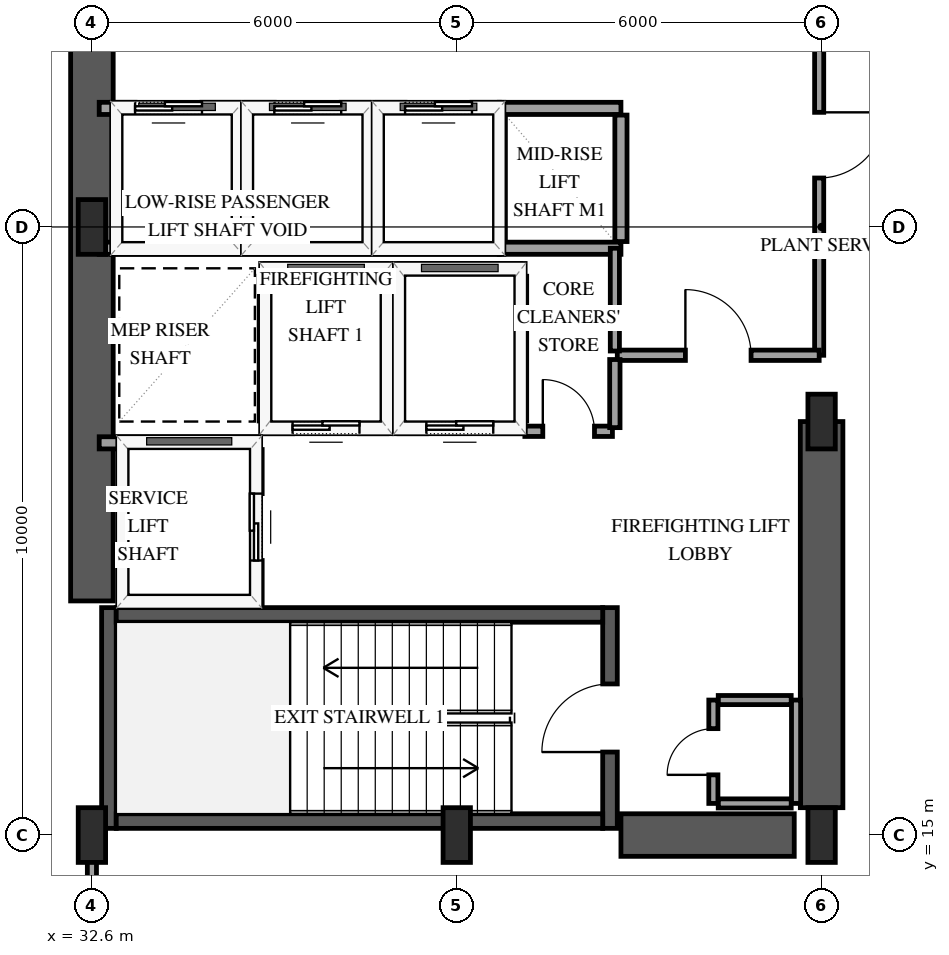
"""IFC4 building model, lengths in metres.
Left out: names, types, materials, properties, quantities, classifications, styles, units other than length and angle.
Written with IfcOpenShell. Run it as: python <this file> out.ifc"""

import sys

from ifc_helpers import new_model, si_unit, direction, frame, frame_2d, origin, origin_2d, place, context, subcontext, project, spatial, rectangle, extrude, element, fill, save


model = new_model("IFC4")
c1 = context("Model", 3, precision=1e-05, world=origin(), true_north=direction((0.0, 1.0)))
c2 = subcontext(c1, "Body", "Model", "MODEL_VIEW")
j1 = project(units=[si_unit("LENGTHUNIT", "METRE"), si_unit("PLANEANGLEUNIT", "RADIAN")], contexts=[c1])
p1 = place(None, origin())
s1 = spatial("IfcSite", under=j1, at=p1, CompositionType="ELEMENT")
p2 = place(p1, origin())
s2 = spatial("IfcBuilding", under=s1, at=p2, CompositionType="ELEMENT")
p3 = place(p2, frame((0.0, 0.0, 82.6)))
s3 = spatial("IfcBuildingStorey", under=s2, at=p3, CompositionType="ELEMENT", Elevation=82.6)
p4 = place(p3, frame((32.88, 15.11, 0.0), z_axis=(0.0, 0.0, 1.0), x_axis=(0.0, 1.0, 0.0)))
e1 = element("IfcWall", 1, at=p4, inside=s3, PredefinedType="SHEAR", context=c2, shape_type="SweptSolid", body=[
    extrude(rectangle(XDim=3.63, YDim=0.24, at=frame_2d((1.815, 0.0))), origin(), (0.0, 0.0, 1.0), 4.8),
])
p5 = place(p3, frame((41.12, 15.11, 0.0), z_axis=(0.0, 0.0, 1.0), x_axis=(0.0, 1.0, 0.0)))
e2 = element("IfcWall", 2, at=p5, inside=s3, PredefinedType="SHEAR", context=c2, shape_type="SweptSolid", body=[
    extrude(rectangle(XDim=3.63, YDim=0.24, at=frame_2d((1.815, 0.0))), origin(), (0.0, 0.0, 1.0), 4.8),
])
p6 = place(p5, frame((1.255, 0.0, 0.0)))
e3 = element("IfcOpeningElement", 3, at=p6, cuts=e2, PredefinedType="OPENING", context=c2, shape_type="SweptSolid", body=[
    extrude(rectangle(XDim=1.12, YDim=2.15, at=frame_2d((0.56, 1.075))), frame((0.0, 0.13, 0.0), z_axis=(0.0, -1.0, 0.0), x_axis=(1.0, 0.0, 0.0)), (0.0, 0.0, 1.0), 0.26),
])
for number, where, z_axis, x_axis in (
    (4, (33.0, 15.23, 0.0), (0.0, 0.0, 1.0), (1.0, 0.0, 0.0)),
    (5, (33.0, 18.62, 0.0), (0.0, 0.0, 1.0), (1.0, 0.0, 0.0)),
):
    element("IfcWall", number, at=place(p3, frame(where, z_axis=z_axis, x_axis=x_axis)), inside=s3, PredefinedType="SHEAR", context=c2, shape_type="SweptSolid", body=[
        extrude(rectangle(XDim=8.0, YDim=0.24, at=frame_2d((4.0, 0.0))), origin(), (0.0, 0.0, 1.0), 4.8),
    ])
p7 = place(p3, frame((32.6, 18.85, 0.0), z_axis=(0.0, 0.0, 1.0), x_axis=(0.0, 1.0, 0.0)))
e6 = element("IfcWall", 6, at=p7, inside=s3, PredefinedType="SHEAR", context=c2, shape_type="SweptSolid", body=[
    extrude(rectangle(XDim=12.3, YDim=0.7, at=frame_2d((6.15, 0.0))), origin(), (0.0, 0.0, 1.0), 4.8),
])
p8 = place(p3, frame((41.3, 15.0, 0.0), z_axis=(0.0, 0.0, 1.0), x_axis=(1.0, 0.0, 0.0)))
e7 = element("IfcWall", 7, at=p8, inside=s3, PredefinedType="SHEAR", context=c2, shape_type="SweptSolid", body=[
    extrude(rectangle(XDim=2.85, YDim=0.7, at=frame_2d((1.425, 0.0))), origin(), (0.0, 0.0, 1.0), 4.8),
])
p9 = place(p3, frame((44.6, 15.45, 0.0), z_axis=(0.0, 0.0, 1.0), x_axis=(0.0, 1.0, 0.0)))
e8 = element("IfcWall", 8, at=p9, inside=s3, PredefinedType="SHEAR", context=c2, shape_type="SweptSolid", body=[
    extrude(rectangle(XDim=6.35, YDim=0.7, at=frame_2d((3.175, 0.0))), origin(), (0.0, 0.0, 1.0), 4.8),
])
for number, where, z_axis, x_axis in (
    (9, (32.6, 15.0, 0.0), (0.0, 0.0, 1.0), (1.0, 0.0, 0.0)),
    (10, (32.6, 25.0, 0.0), (0.0, 0.0, 1.0), (1.0, 0.0, 0.0)),
    (11, (38.6, 15.0, 0.0), (0.0, 0.0, 1.0), (1.0, 0.0, 0.0)),
    (12, (44.6, 15.0, 0.0), (0.0, 0.0, 1.0), (1.0, 0.0, 0.0)),
    (13, (44.6, 21.8, 0.0), (0.0, 0.0, 1.0), (1.0, 0.0, 0.0)),
):
    element("IfcColumn", number, at=place(p3, frame(where, z_axis=z_axis, x_axis=x_axis)), inside=s3, PredefinedType="PILASTER", context=c2, shape_type="SweptSolid", body=[
        extrude(rectangle(XDim=0.45, YDim=0.9, at=origin_2d()), origin(), (0.0, 0.0, 1.0), 4.5),
    ])
p10 = place(p3, frame((35.45, 21.7, 0.0), z_axis=(0.0, 0.0, 1.0), x_axis=(1.0, 0.0, 0.0)))
e14 = element("IfcWall", 14, at=p10, inside=s3, PredefinedType="SOLIDWALL", context=c2, shape_type="SweptSolid", body=[
    extrude(rectangle(XDim=2.0, YDim=0.2, at=frame_2d((1.0, 0.0))), origin(), (0.0, 0.0, 1.0), 4.5),
])
p11 = place(p10, frame((0.45, 0.0, 0.0)))
e15 = element("IfcOpeningElement", 15, at=p11, cuts=e14, PredefinedType="OPENING", context=c2, shape_type="SweptSolid", body=[
    extrude(rectangle(XDim=1.1, YDim=2.15, at=frame_2d((0.55, 1.075))), frame((0.0, 0.11, 0.0), z_axis=(0.0, -1.0, 0.0), x_axis=(1.0, 0.0, 0.0)), (0.0, 0.0, 1.0), 0.22),
])
p12 = place(p3, frame((35.45, 24.3, 0.0), z_axis=(0.0, 0.0, 1.0), x_axis=(1.0, 0.0, 0.0)))
e16 = element("IfcWall", 16, at=p12, inside=s3, PredefinedType="SOLIDWALL", context=c2, shape_type="SweptSolid", body=[
    extrude(rectangle(XDim=2.0, YDim=0.2, at=frame_2d((1.0, 0.0))), origin(), (0.0, 0.0, 1.0), 4.5),
])
for number, where, z_axis, x_axis in (
    (17, (35.45, 21.81, 0.0), (0.0, 0.0, 1.0), (0.0, 1.0, 0.0)),
    (18, (37.45, 21.81, 0.0), (0.0, 0.0, 1.0), (0.0, 1.0, 0.0)),
):
    element("IfcWall", number, at=place(p3, frame(where, z_axis=z_axis, x_axis=x_axis)), inside=s3, PredefinedType="SOLIDWALL", context=c2, shape_type="SweptSolid", body=[
        extrude(rectangle(XDim=2.38, YDim=0.2, at=frame_2d((1.19, 0.0))), origin(), (0.0, 0.0, 1.0), 4.5),
    ])
p13 = place(p3, frame((37.65, 21.7, 0.0), z_axis=(0.0, 0.0, 1.0), x_axis=(1.0, 0.0, 0.0)))
e19 = element("IfcWall", 19, at=p13, inside=s3, PredefinedType="SOLIDWALL", context=c2, shape_type="SweptSolid", body=[
    extrude(rectangle(XDim=2.0, YDim=0.2, at=frame_2d((1.0, 0.0))), origin(), (0.0, 0.0, 1.0), 4.5),
])
p14 = place(p13, frame((0.45, 0.0, 0.0)))
e20 = element("IfcOpeningElement", 20, at=p14, cuts=e19, PredefinedType="OPENING", context=c2, shape_type="SweptSolid", body=[
    extrude(rectangle(XDim=1.1, YDim=2.15, at=frame_2d((0.55, 1.075))), frame((0.0, 0.11, 0.0), z_axis=(0.0, -1.0, 0.0), x_axis=(1.0, 0.0, 0.0)), (0.0, 0.0, 1.0), 0.22),
])
p15 = place(p3, frame((37.65, 24.3, 0.0), z_axis=(0.0, 0.0, 1.0), x_axis=(1.0, 0.0, 0.0)))
e21 = element("IfcWall", 21, at=p15, inside=s3, PredefinedType="SOLIDWALL", context=c2, shape_type="SweptSolid", body=[
    extrude(rectangle(XDim=2.0, YDim=0.2, at=frame_2d((1.0, 0.0))), origin(), (0.0, 0.0, 1.0), 4.5),
])
p16 = place(p3, frame((39.65, 21.81, 0.0), z_axis=(0.0, 0.0, 1.0), x_axis=(0.0, 1.0, 0.0)))
e22 = element("IfcWall", 22, at=p16, inside=s3, PredefinedType="SOLIDWALL", context=c2, shape_type="SweptSolid", body=[
    extrude(rectangle(XDim=2.38, YDim=0.2, at=frame_2d((1.19, 0.0))), origin(), (0.0, 0.0, 1.0), 4.5),
])
p17 = place(p3, frame((32.72, 21.45, 0.0), z_axis=(0.0, 0.0, 1.0), x_axis=(1.0, 0.0, 0.0)))
e23 = element("IfcWall", 23, at=p17, inside=s3, PredefinedType="SOLIDWALL", context=c2, shape_type="SweptSolid", body=[
    extrude(rectangle(XDim=2.58, YDim=0.2, at=frame_2d((1.29, 0.0))), origin(), (0.0, 0.0, 1.0), 4.5),
])
p18 = place(p3, frame((35.3, 18.79, 0.0), z_axis=(0.0, 0.0, 1.0), x_axis=(0.0, 1.0, 0.0)))
e24 = element("IfcWall", 24, at=p18, inside=s3, PredefinedType="SOLIDWALL", context=c2, shape_type="SweptSolid", body=[
    extrude(rectangle(XDim=2.55, YDim=0.2, at=frame_2d((1.275, 0.0))), origin(), (0.0, 0.0, 1.0), 4.5),
])
p19 = place(p18, frame((0.725, 0.0, 0.0)))
e25 = element("IfcOpeningElement", 25, at=p19, cuts=e24, PredefinedType="OPENING", context=c2, shape_type="SweptSolid", body=[
    extrude(rectangle(XDim=1.1, YDim=2.15, at=frame_2d((0.55, 1.075))), frame((0.0, 0.11, 0.0), z_axis=(0.0, -1.0, 0.0), x_axis=(1.0, 0.0, 0.0)), (0.0, 0.0, 1.0), 0.22),
])
p20 = place(p3, frame((32.72, 24.65, 0.0), z_axis=(0.0, 0.0, 1.0), x_axis=(1.0, 0.0, 0.0)))
e26 = element("IfcWall", 26, at=p20, inside=s3, PredefinedType="SOLIDWALL", context=c2, shape_type="SweptSolid", body=[
    extrude(rectangle(XDim=2.28, YDim=0.2, at=frame_2d((1.14, 0.0))), origin(), (0.0, 0.0, 1.0), 4.5),
])
p21 = place(p3, frame((32.72, 26.95, 0.0), z_axis=(0.0, 0.0, 1.0), x_axis=(1.0, 0.0, 0.0)))
e27 = element("IfcWall", 27, at=p21, inside=s3, PredefinedType="SOLIDWALL", context=c2, shape_type="SweptSolid", body=[
    extrude(rectangle(XDim=2.28, YDim=0.2, at=frame_2d((1.14, 0.0))), origin(), (0.0, 0.0, 1.0), 4.5),
])
p22 = place(p21, frame((0.59, 0.0, 0.0)))
e28 = element("IfcOpeningElement", 28, at=p22, cuts=e27, PredefinedType="OPENING", context=c2, shape_type="SweptSolid", body=[
    extrude(rectangle(XDim=1.1, YDim=2.15, at=frame_2d((0.55, 1.075))), frame((0.0, 0.11, 0.0), z_axis=(0.0, -1.0, 0.0), x_axis=(1.0, 0.0, 0.0)), (0.0, 0.0, 1.0), 0.22),
])
p23 = place(p3, frame((35.0, 24.76, 0.0), z_axis=(0.0, 0.0, 1.0), x_axis=(0.0, 1.0, 0.0)))
e29 = element("IfcWall", 29, at=p23, inside=s3, PredefinedType="SOLIDWALL", context=c2, shape_type="SweptSolid", body=[
    extrude(rectangle(XDim=2.08, YDim=0.2, at=frame_2d((1.04, 0.0))), origin(), (0.0, 0.0, 1.0), 4.5),
])
p24 = place(p3, frame((35.15, 24.65, 0.0), z_axis=(0.0, 0.0, 1.0), x_axis=(1.0, 0.0, 0.0)))
e30 = element("IfcWall", 30, at=p24, inside=s3, PredefinedType="SOLIDWALL", context=c2, shape_type="SweptSolid", body=[
    extrude(rectangle(XDim=2.0, YDim=0.2, at=frame_2d((1.0, 0.0))), origin(), (0.0, 0.0, 1.0), 4.5),
])
p25 = place(p3, frame((35.15, 26.95, 0.0), z_axis=(0.0, 0.0, 1.0), x_axis=(1.0, 0.0, 0.0)))
e31 = element("IfcWall", 31, at=p25, inside=s3, PredefinedType="SOLIDWALL", context=c2, shape_type="SweptSolid", body=[
    extrude(rectangle(XDim=2.0, YDim=0.2, at=frame_2d((1.0, 0.0))), origin(), (0.0, 0.0, 1.0), 4.5),
])
p26 = place(p25, frame((0.45, 0.0, 0.0)))
e32 = element("IfcOpeningElement", 32, at=p26, cuts=e31, PredefinedType="OPENING", context=c2, shape_type="SweptSolid", body=[
    extrude(rectangle(XDim=1.1, YDim=2.15, at=frame_2d((0.55, 1.075))), frame((0.0, 0.11, 0.0), z_axis=(0.0, -1.0, 0.0), x_axis=(1.0, 0.0, 0.0)), (0.0, 0.0, 1.0), 0.22),
])
p27 = place(p3, frame((37.15, 24.76, 0.0), z_axis=(0.0, 0.0, 1.0), x_axis=(0.0, 1.0, 0.0)))
e33 = element("IfcWall", 33, at=p27, inside=s3, PredefinedType="SOLIDWALL", context=c2, shape_type="SweptSolid", body=[
    extrude(rectangle(XDim=2.08, YDim=0.2, at=frame_2d((1.04, 0.0))), origin(), (0.0, 0.0, 1.0), 4.5),
])
p28 = place(p3, frame((37.3, 24.65, 0.0), z_axis=(0.0, 0.0, 1.0), x_axis=(1.0, 0.0, 0.0)))
e34 = element("IfcWall", 34, at=p28, inside=s3, PredefinedType="SOLIDWALL", context=c2, shape_type="SweptSolid", body=[
    extrude(rectangle(XDim=2.0, YDim=0.2, at=frame_2d((1.0, 0.0))), origin(), (0.0, 0.0, 1.0), 4.5),
])
p29 = place(p3, frame((37.3, 26.95, 0.0), z_axis=(0.0, 0.0, 1.0), x_axis=(1.0, 0.0, 0.0)))
e35 = element("IfcWall", 35, at=p29, inside=s3, PredefinedType="SOLIDWALL", context=c2, shape_type="SweptSolid", body=[
    extrude(rectangle(XDim=2.0, YDim=0.2, at=frame_2d((1.0, 0.0))), origin(), (0.0, 0.0, 1.0), 4.5),
])
p30 = place(p29, frame((0.45, 0.0, 0.0)))
e36 = element("IfcOpeningElement", 36, at=p30, cuts=e35, PredefinedType="OPENING", context=c2, shape_type="SweptSolid", body=[
    extrude(rectangle(XDim=1.1, YDim=2.15, at=frame_2d((0.55, 1.075))), frame((0.0, 0.11, 0.0), z_axis=(0.0, -1.0, 0.0), x_axis=(1.0, 0.0, 0.0)), (0.0, 0.0, 1.0), 0.22),
])
p31 = place(p3, frame((39.3, 24.76, 0.0), z_axis=(0.0, 0.0, 1.0), x_axis=(0.0, 1.0, 0.0)))
e37 = element("IfcWall", 37, at=p31, inside=s3, PredefinedType="SOLIDWALL", context=c2, shape_type="SweptSolid", body=[
    extrude(rectangle(XDim=2.08, YDim=0.2, at=frame_2d((1.04, 0.0))), origin(), (0.0, 0.0, 1.0), 4.5),
])
for number, where, z_axis, x_axis in (
    (38, (39.3, 24.65, 0.0), (0.0, 0.0, 1.0), (1.0, 0.0, 0.0)),
    (39, (39.3, 26.95, 0.0), (0.0, 0.0, 1.0), (1.0, 0.0, 0.0)),
):
    element("IfcWall", number, at=place(p3, frame(where, z_axis=z_axis, x_axis=x_axis)), inside=s3, PredefinedType="SOLIDWALL", context=c2, shape_type="SweptSolid", body=[
        extrude(rectangle(XDim=2.0, YDim=0.2, at=frame_2d((1.0, 0.0))), origin(), (0.0, 0.0, 1.0), 4.5),
    ])
p32 = place(p3, frame((41.3, 24.76, 0.0), z_axis=(0.0, 0.0, 1.0), x_axis=(0.0, 1.0, 0.0)))
e40 = element("IfcWall", 40, at=p32, inside=s3, PredefinedType="SOLIDWALL", context=c2, shape_type="SweptSolid", body=[
    extrude(rectangle(XDim=2.08, YDim=0.2, at=frame_2d((1.04, 0.0))), origin(), (0.0, 0.0, 1.0), 4.5),
])
for number, where, z_axis, x_axis in (
    (41, (42.9, 15.52, 0.0), (0.0, 0.0, 1.0), (1.0, 0.0, 0.0)),
    (42, (42.9, 17.22, 0.0), (0.0, 0.0, 1.0), (1.0, 0.0, 0.0)),
):
    element("IfcWall", number, at=place(p3, frame(where, z_axis=z_axis, x_axis=x_axis)), inside=s3, PredefinedType="PARTITIONING", context=c2, shape_type="SweptSolid", body=[
        extrude(rectangle(XDim=1.2, YDim=0.15, at=frame_2d((0.6, 0.0))), origin(), (0.0, 0.0, 1.0), 4.5),
    ])
p33 = place(p3, frame((44.18, 15.52, 0.0), z_axis=(0.0, 0.0, 1.0), x_axis=(0.0, 1.0, 0.0)))
e43 = element("IfcWall", 43, at=p33, inside=s3, PredefinedType="PARTITIONING", context=c2, shape_type="SweptSolid", body=[
    extrude(rectangle(XDim=1.7, YDim=0.15, at=frame_2d((0.85, 0.0))), origin(), (0.0, 0.0, 1.0), 4.5),
])
p34 = place(p3, frame((42.82, 15.52, 0.0), z_axis=(0.0, 0.0, 1.0), x_axis=(0.0, 1.0, 0.0)))
e44 = element("IfcWall", 44, at=p34, inside=s3, PredefinedType="PARTITIONING", context=c2, shape_type="SweptSolid", body=[
    extrude(rectangle(XDim=1.7, YDim=0.15, at=frame_2d((0.85, 0.0))), origin(), (0.0, 0.0, 1.0), 4.5),
])
p35 = place(p34, frame((0.47, 0.0, 0.0)))
e45 = element("IfcOpeningElement", 45, at=p35, cuts=e44, PredefinedType="OPENING", context=c2, shape_type="SweptSolid", body=[
    extrude(rectangle(XDim=0.76, YDim=2.0, at=frame_2d((0.38, 1.0))), frame((0.0, 0.085, 0.0), z_axis=(0.0, -1.0, 0.0), x_axis=(1.0, 0.0, 0.0)), (0.0, 0.0, 1.0), 0.17),
])
p36 = place(p3, frame((44.56, 29.8, 0.0), z_axis=(0.0, 0.0, 1.0), x_axis=(0.0, -1.0, 0.0)))
e46 = element("IfcWall", 46, at=p36, inside=s3, PredefinedType="PARTITIONING", context=c2, shape_type="SweptSolid", body=[
    extrude(rectangle(XDim=6.91, YDim=0.15, at=frame_2d((3.455, 0.0))), origin(), (0.0, 0.0, 1.0), 3.54),
])
p37 = place(p36, frame((2.915, 0.0, 0.0)))
e47 = element("IfcOpeningElement", 47, at=p37, cuts=e46, PredefinedType="OPENING", context=c2, shape_type="SweptSolid", body=[
    extrude(rectangle(XDim=1.08, YDim=2.15, at=frame_2d((0.54, 1.075))), frame((0.0, 0.085, 0.0), z_axis=(0.0, -1.0, 0.0), x_axis=(1.0, 0.0, 0.0)), (0.0, 0.0, 1.0), 0.17),
])
p38 = place(p3, frame((41.24, 22.89, 0.0), z_axis=(0.0, 0.0, 1.0), x_axis=(1.0, 0.0, 0.0)))
e48 = element("IfcWall", 48, at=p38, inside=s3, PredefinedType="PARTITIONING", context=c2, shape_type="SweptSolid", body=[
    extrude(rectangle(XDim=3.32, YDim=0.17, at=frame_2d((1.66, 0.0))), origin(), (0.0, 0.0, 1.0), 4.5),
])
p39 = place(p38, frame((1.12, 0.0, 0.0)))
e49 = element("IfcOpeningElement", 49, at=p39, cuts=e48, PredefinedType="OPENING", context=c2, shape_type="SweptSolid", body=[
    extrude(rectangle(XDim=1.08, YDim=2.15, at=frame_2d((0.54, 1.075))), frame((0.0, 0.095, 0.0), z_axis=(0.0, -1.0, 0.0), x_axis=(1.0, 0.0, 0.0)), (0.0, 0.0, 1.0), 0.19),
])
p40 = place(p3, frame((32.6, 13.02, 0.0), z_axis=(0.0, 0.0, 1.0), x_axis=(0.0, 1.0, 0.0)))
e50 = element("IfcWall", 50, at=p40, inside=s3, PredefinedType="PARTITIONING", context=c2, shape_type="SweptSolid", body=[
    extrude(rectangle(XDim=1.86, YDim=0.15, at=frame_2d((0.93, 0.0))), origin(), (0.0, 0.0, 1.0), 4.5),
])
p41 = place(p3, frame((41.2, 22.96, 0.0), z_axis=(0.0, 0.0, 1.0), x_axis=(0.0, 1.0, 0.0)))
e51 = element("IfcWall", 51, at=p41, inside=s3, PredefinedType="PARTITIONING", context=c2, shape_type="SweptSolid", body=[
    extrude(rectangle(XDim=1.69, YDim=0.15, at=frame_2d((0.845, 0.0))), origin(), (0.0, 0.0, 1.0), 4.5),
])
p42 = place(p3, frame((39.72, 21.64, 0.0), z_axis=(0.0, 0.0, 1.0), x_axis=(1.0, 0.0, 0.0)))
e52 = element("IfcWall", 52, at=p42, inside=s3, PredefinedType="PARTITIONING", context=c2, shape_type="SweptSolid", body=[
    extrude(rectangle(XDim=1.44, YDim=0.17, at=frame_2d((0.72, 0.0))), origin(), (0.0, 0.0, 1.0), 4.5),
])
p43 = place(p42, frame((0.295, 0.0, 0.0)))
e53 = element("IfcOpeningElement", 53, at=p43, cuts=e52, PredefinedType="OPENING", context=c2, shape_type="SweptSolid", body=[
    extrude(rectangle(XDim=0.85, YDim=2.1, at=frame_2d((0.425, 1.05))), frame((0.0, 0.095, 0.0), z_axis=(0.0, -1.0, 0.0), x_axis=(1.0, 0.0, 0.0)), (0.0, 0.0, 1.0), 0.19),
])
p44 = place(p3, frame((41.2, 21.7, 0.0), z_axis=(0.0, 0.0, 1.0), x_axis=(0.0, 1.0, 0.0)))
e54 = element("IfcWall", 54, at=p44, inside=s3, PredefinedType="PARTITIONING", context=c2, shape_type="SweptSolid", body=[
    extrude(rectangle(XDim=1.12, YDim=0.17, at=frame_2d((0.56, 0.0))), origin(), (0.0, 0.0, 1.0), 4.5),
])
p45 = place(p11, origin())
e55 = element("IfcDoor", 55, at=p45, inside=s3, OperationType="SLIDING_TO_LEFT", PredefinedType="DOOR", context=c2, shape_type="SweptSolid", body=[
    extrude(rectangle(XDim=1.1, YDim=2.15, at=frame_2d((0.55, 1.075))), frame((0.0, 0.025, 0.0), z_axis=(0.0, -1.0, 0.0), x_axis=(1.0, 0.0, 0.0)), (0.0, 0.0, 1.0), 0.05),
])
fill(e15, e55)
p46 = place(p14, origin())
e56 = element("IfcDoor", 56, at=p46, inside=s3, OperationType="SLIDING_TO_LEFT", PredefinedType="DOOR", context=c2, shape_type="SweptSolid", body=[
    extrude(rectangle(XDim=1.1, YDim=2.15, at=frame_2d((0.55, 1.075))), frame((0.0, 0.025, 0.0), z_axis=(0.0, -1.0, 0.0), x_axis=(1.0, 0.0, 0.0)), (0.0, 0.0, 1.0), 0.05),
])
fill(e20, e56)
p47 = place(p19, origin())
e57 = element("IfcDoor", 57, at=p47, inside=s3, OperationType="SLIDING_TO_LEFT", PredefinedType="DOOR", context=c2, shape_type="SweptSolid", body=[
    extrude(rectangle(XDim=1.1, YDim=2.15, at=frame_2d((0.55, 1.075))), frame((0.0, 0.025, 0.0), z_axis=(0.0, -1.0, 0.0), x_axis=(1.0, 0.0, 0.0)), (0.0, 0.0, 1.0), 0.05),
])
fill(e25, e57)
p48 = place(p22, origin())
e58 = element("IfcDoor", 58, at=p48, inside=s3, OperationType="SLIDING_TO_LEFT", PredefinedType="DOOR", context=c2, shape_type="SweptSolid", body=[
    extrude(rectangle(XDim=1.1, YDim=2.15, at=frame_2d((0.55, 1.075))), frame((0.0, 0.025, 0.0), z_axis=(0.0, -1.0, 0.0), x_axis=(1.0, 0.0, 0.0)), (0.0, 0.0, 1.0), 0.05),
])
fill(e28, e58)
p49 = place(p26, origin())
e59 = element("IfcDoor", 59, at=p49, inside=s3, OperationType="SLIDING_TO_LEFT", PredefinedType="DOOR", context=c2, shape_type="SweptSolid", body=[
    extrude(rectangle(XDim=1.1, YDim=2.15, at=frame_2d((0.55, 1.075))), frame((0.0, 0.025, 0.0), z_axis=(0.0, -1.0, 0.0), x_axis=(1.0, 0.0, 0.0)), (0.0, 0.0, 1.0), 0.05),
])
fill(e32, e59)
p50 = place(p30, origin())
e60 = element("IfcDoor", 60, at=p50, inside=s3, OperationType="SLIDING_TO_LEFT", PredefinedType="DOOR", context=c2, shape_type="SweptSolid", body=[
    extrude(rectangle(XDim=1.1, YDim=2.15, at=frame_2d((0.55, 1.075))), frame((0.0, 0.025, 0.0), z_axis=(0.0, -1.0, 0.0), x_axis=(1.0, 0.0, 0.0)), (0.0, 0.0, 1.0), 0.05),
])
fill(e36, e60)
p51 = place(p6, origin())
e61 = element("IfcDoor", 61, at=p51, inside=s3, OperationType="SINGLE_SWING_LEFT", PredefinedType="DOOR", context=c2, shape_type="SweptSolid", body=[
    extrude(rectangle(XDim=1.12, YDim=2.15, at=frame_2d((0.56, 1.075))), frame((0.0, 0.025, 0.0), z_axis=(0.0, -1.0, 0.0), x_axis=(1.0, 0.0, 0.0)), (0.0, 0.0, 1.0), 0.05),
])
fill(e3, e61)
p52 = place(p35, origin())
e62 = element("IfcDoor", 62, at=p52, inside=s3, OperationType="SINGLE_SWING_LEFT", PredefinedType="TRAPDOOR", context=c2, shape_type="SweptSolid", body=[
    extrude(rectangle(XDim=0.76, YDim=2.0, at=frame_2d((0.38, 1.0))), frame((0.0, 0.025, 0.0), z_axis=(0.0, -1.0, 0.0), x_axis=(1.0, 0.0, 0.0)), (0.0, 0.0, 1.0), 0.05),
])
fill(e45, e62)
p53 = place(p37, origin())
e63 = element("IfcDoor", 63, at=p53, inside=s3, OperationType="SINGLE_SWING_LEFT", PredefinedType="DOOR", context=c2, shape_type="SweptSolid", body=[
    extrude(rectangle(XDim=1.08, YDim=2.15, at=frame_2d((0.54, 1.075))), frame((0.0, 0.025, 0.0), z_axis=(0.0, -1.0, 0.0), x_axis=(1.0, 0.0, 0.0)), (0.0, 0.0, 1.0), 0.05),
])
fill(e47, e63)
p54 = place(p39, origin())
e64 = element("IfcDoor", 64, at=p54, inside=s3, OperationType="SINGLE_SWING_LEFT", PredefinedType="DOOR", context=c2, shape_type="SweptSolid", body=[
    extrude(rectangle(XDim=1.08, YDim=2.15, at=frame_2d((0.54, 1.075))), frame((0.0, 0.025, 0.0), z_axis=(0.0, -1.0, 0.0), x_axis=(1.0, 0.0, 0.0)), (0.0, 0.0, 1.0), 0.05),
])
fill(e49, e64)
p55 = place(p43, origin())
e65 = element("IfcDoor", 65, at=p55, inside=s3, OperationType="SINGLE_SWING_LEFT", PredefinedType="DOOR", context=c2, shape_type="SweptSolid", body=[
    extrude(rectangle(XDim=0.85, YDim=2.1, at=frame_2d((0.425, 1.05))), frame((0.0, 0.025, 0.0), z_axis=(0.0, -1.0, 0.0), x_axis=(1.0, 0.0, 0.0)), (0.0, 0.0, 1.0), 0.05),
])
fill(e53, e65)
save(model, sys.argv[1])
